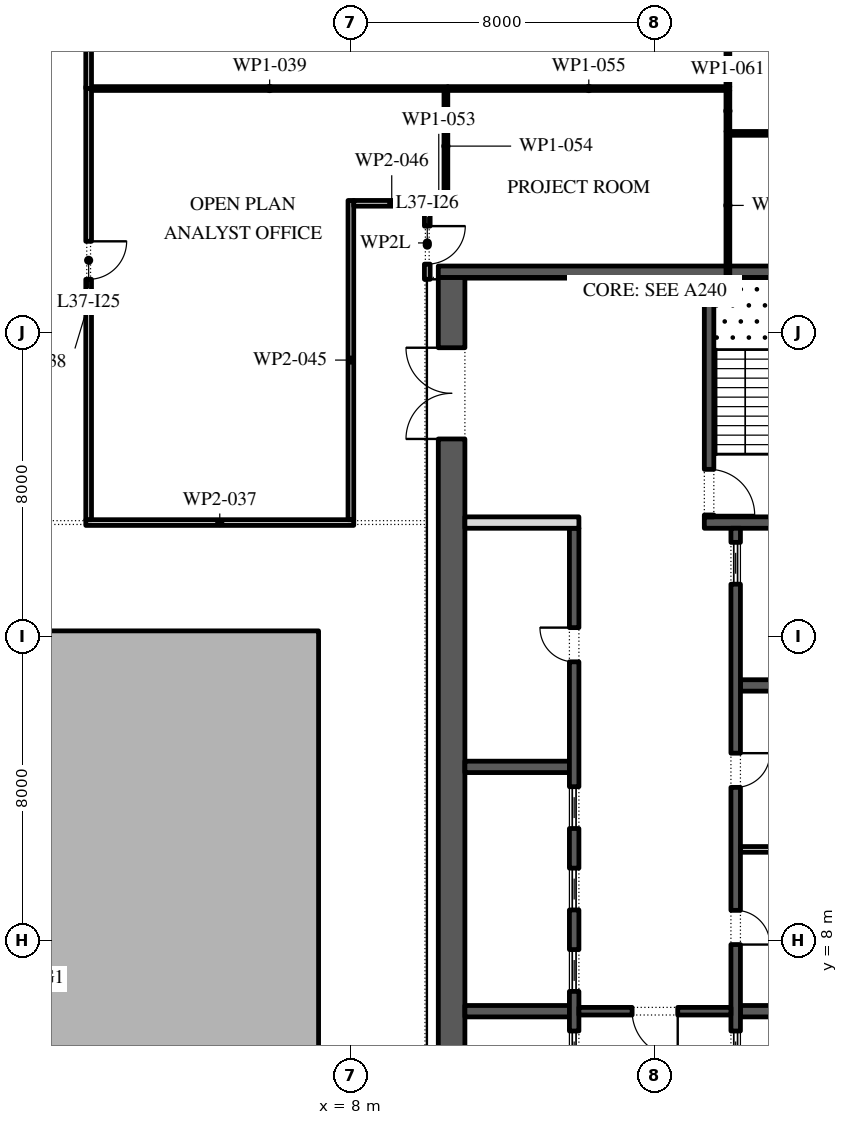
"""IFC4 building model, lengths in metres.
Left out: names, types, materials, properties, quantities, classifications, styles, units other than length and angle.
Written with IfcOpenShell. Run it as: python <this file> out.ifc"""

import sys

from ifc_helpers import new_model, si_unit, direction, frame, frame_2d, origin, place, context, subcontext, project, spatial, polyline, rectangle, outline, extrude, element, fill, save


model = new_model("IFC4")
c1 = context("Model", 3, precision=1e-05, world=origin(), true_north=direction((0.0, 1.0)))
c2 = subcontext(c1, "Body", "Model", "MODEL_VIEW")
j1 = project(units=[si_unit("LENGTHUNIT", "METRE"), si_unit("PLANEANGLEUNIT", "RADIAN")], contexts=[c1])
p1 = place(None, origin())
s1 = spatial("IfcSite", under=j1, at=p1, CompositionType="ELEMENT")
p2 = place(p1, origin())
s2 = spatial("IfcBuilding", under=s1, at=p2, CompositionType="ELEMENT")
p3 = place(p2, frame((0.0, 0.0, 171.6)))
s3 = spatial("IfcBuildingStorey", under=s2, at=p3, CompositionType="ELEMENT", Elevation=171.6)
p4 = place(p3, origin())
e1 = element("IfcWall", 1, at=p4, inside=s3, PredefinedType="STANDARD", context=c2, shape_type="SweptSolid", body=[
    extrude(outline(polyline([(-7.15, -2.15), (7.15, -2.15), (7.15, 16.15), (-7.15, 16.15), (-7.15, -2.15)]), holes=[polyline([(-7.0, -2.0), (-7.0, 16.0), (7.0, 16.0), (7.0, -2.0), (-7.0, -2.0)])]), origin(), (0.0, 0.0, 1.0), 4.0),
])
p5 = place(p3, frame((10.65, -2.45, 0.0), z_axis=(0.0, 0.0, 1.0), x_axis=(0.0, 1.0, 0.0)))
e2 = element("IfcWall", 2, at=p5, inside=s3, PredefinedType="SHEAR", context=c2, shape_type="SweptSolid", body=[
    extrude(rectangle(XDim=27.9, YDim=0.7, at=frame_2d((13.95, 0.0))), origin(), (0.0, 0.0, 1.0), 4.0),
])
p6 = place(p5, frame((23.65, 0.0, 0.0)))
e3 = element("IfcOpeningElement", 3, at=p6, cuts=e2, PredefinedType="OPENING", context=c2, shape_type="SweptSolid", body=[
    extrude(rectangle(XDim=2.4, YDim=2.1, at=frame_2d((1.2, 1.05))), frame((0.0, 0.36, 0.0), z_axis=(0.0, -1.0, 0.0), x_axis=(1.0, 0.0, 0.0)), (0.0, 0.0, 1.0), 0.72),
])
p7 = place(p5, frame((0.788, 0.0, 0.0)))
e4 = element("IfcOpeningElement", 4, at=p7, cuts=e2, PredefinedType="OPENING", context=c2, shape_type="SweptSolid", body=[
    extrude(rectangle(XDim=0.9, YDim=2.1, at=frame_2d((0.45, 1.05))), frame((0.0, 0.36, 0.0), z_axis=(0.0, -1.0, 0.0), x_axis=(1.0, 0.0, 0.0)), (0.0, 0.0, 1.0), 0.72),
])
p8 = place(p5, frame((3.962, 0.0, 0.0)))
e5 = element("IfcOpeningElement", 5, at=p8, cuts=e2, PredefinedType="OPENING", context=c2, shape_type="SweptSolid", body=[
    extrude(rectangle(XDim=1.0, YDim=2.1, at=frame_2d((0.5, 1.05))), frame((0.0, 0.36, 0.0), z_axis=(0.0, -1.0, 0.0), x_axis=(1.0, 0.0, 0.0)), (0.0, 0.0, 1.0), 0.72),
])
p9 = place(p3, frame((10.3, 25.6, 0.0), z_axis=(0.0, 0.0, 1.0), x_axis=(1.0, 0.0, 0.0)))
e6 = element("IfcWall", 6, at=p9, inside=s3, PredefinedType="SHEAR", context=c2, shape_type="SweptSolid", body=[
    extrude(rectangle(XDim=11.4, YDim=0.3, at=frame_2d((5.7, 0.0))), origin(), (0.0, 0.0, 1.0), 4.0),
])
p10 = place(p3, frame((17.3, 19.0, 0.0), z_axis=(0.0, 0.0, 1.0), x_axis=(1.0, 0.0, 0.0)))
e7 = element("IfcWall", 7, at=p10, inside=s3, PredefinedType="SHEAR", context=c2, shape_type="SweptSolid", body=[
    extrude(rectangle(XDim=3.7, YDim=0.3, at=frame_2d((1.85, 0.0))), origin(), (0.0, 0.0, 1.0), 4.0),
])
p11 = place(p3, frame((17.425, 19.15, 0.0), z_axis=(0.0, 0.0, 1.0), x_axis=(0.0, 1.0, 0.0)))
e8 = element("IfcWall", 8, at=p11, inside=s3, PredefinedType="SHEAR", context=c2, shape_type="SweptSolid", body=[
    extrude(rectangle(XDim=6.3, YDim=0.25, at=frame_2d((3.15, 0.0))), origin(), (0.0, 0.0, 1.0), 4.0),
])
p12 = place(p11, frame((0.05, 0.0, 0.0)))
e9 = element("IfcOpeningElement", 9, at=p12, cuts=e8, PredefinedType="OPENING", context=c2, shape_type="SweptSolid", body=[
    extrude(rectangle(XDim=1.2, YDim=2.1, at=frame_2d((0.6, 1.05))), frame((0.0, 0.135, 0.0), z_axis=(0.0, -1.0, 0.0), x_axis=(1.0, 0.0, 0.0)), (0.0, 0.0, 1.0), 0.27),
])
for number, where, z_axis, x_axis in (
    (10, (18.25, 6.143, 0.0), (0.0, 0.0, 1.0), (1.0, 0.0, 0.0)),
    (11, (18.25, 14.714, 0.0), (0.0, 0.0, 1.0), (1.0, 0.0, 0.0)),
):
    element("IfcWall", number, at=place(p3, frame(where, z_axis=z_axis, x_axis=x_axis)), inside=s3, PredefinedType="SHEAR", context=c2, shape_type="SweptSolid", body=[
        extrude(rectangle(XDim=2.75, YDim=0.3, at=frame_2d((1.375, 0.0))), origin(), (0.0, 0.0, 1.0), 4.0),
    ])
p13 = place(p3, frame((18.125, 4.15, 0.0), z_axis=(0.0, 0.0, 1.0), x_axis=(0.0, 1.0, 0.0)))
e12 = element("IfcWall", 12, at=p13, inside=s3, PredefinedType="SHEAR", context=c2, shape_type="SweptSolid", body=[
    extrude(rectangle(XDim=14.7, YDim=0.25, at=frame_2d((7.35, 0.0))), origin(), (0.0, 0.0, 1.0), 4.0),
])
p14 = place(p13, frame((3.746, 0.0, 0.0)))
e13 = element("IfcOpeningElement", 13, at=p14, cuts=e12, PredefinedType="OPENING", context=c2, shape_type="SweptSolid", body=[
    extrude(rectangle(XDim=0.9, YDim=2.1, at=frame_2d((0.45, 1.05))), frame((0.0, 0.135, 0.0), z_axis=(0.0, -1.0, 0.0), x_axis=(1.0, 0.0, 0.0)), (0.0, 0.0, 1.0), 0.27),
])
p15 = place(p13, frame((7.882, 0.0, 0.0)))
e14 = element("IfcOpeningElement", 14, at=p15, cuts=e12, PredefinedType="OPENING", context=c2, shape_type="SweptSolid", body=[
    extrude(rectangle(XDim=0.9, YDim=2.1, at=frame_2d((0.45, 1.05))), frame((0.0, 0.135, 0.0), z_axis=(0.0, -1.0, 0.0), x_axis=(1.0, 0.0, 0.0)), (0.0, 0.0, 1.0), 0.27),
])
p16 = place(p13, frame((0.371, 0.0, 0.0)))
e15 = element("IfcOpeningElement", 15, at=p16, cuts=e12, PredefinedType="OPENING", context=c2, shape_type="SweptSolid", body=[
    extrude(rectangle(XDim=1.1, YDim=2.1, at=frame_2d((0.55, 1.05))), frame((0.0, 0.135, 0.0), z_axis=(0.0, -1.0, 0.0), x_axis=(1.0, 0.0, 0.0)), (0.0, 0.0, 1.0), 0.27),
])
p17 = place(p13, frame((13.229, 0.0, 0.0)))
e16 = element("IfcOpeningElement", 16, at=p17, cuts=e12, PredefinedType="OPENING", context=c2, shape_type="SweptSolid", body=[
    extrude(rectangle(XDim=1.1, YDim=2.1, at=frame_2d((0.55, 1.05))), frame((0.0, 0.135, 0.0), z_axis=(0.0, -1.0, 0.0), x_axis=(1.0, 0.0, 0.0)), (0.0, 0.0, 1.0), 0.27),
])
p18 = place(p3, frame((18.25, 10.4, 0.0), z_axis=(0.0, 0.0, 1.0), x_axis=(1.0, 0.0, 0.0)))
e17 = element("IfcWall", 17, at=p18, inside=s3, PredefinedType="PARTITIONING", context=c2, shape_type="SweptSolid", body=[
    extrude(rectangle(XDim=2.75, YDim=0.15, at=frame_2d((1.375, 0.0))), origin(), (0.0, 0.0, 1.0), 4.0),
])
for number, where, z_axis, x_axis in (
    (18, (11.0, 6.143, 0.0), (0.0, 0.0, 1.0), (1.0, 0.0, 0.0)),
    (19, (11.0, 12.571, 0.0), (0.0, 0.0, 1.0), (1.0, 0.0, 0.0)),
):
    element("IfcWall", number, at=place(p3, frame(where, z_axis=z_axis, x_axis=x_axis)), inside=s3, PredefinedType="SHEAR", context=c2, shape_type="SweptSolid", body=[
        extrude(rectangle(XDim=2.75, YDim=0.3, at=frame_2d((1.375, 0.0))), origin(), (0.0, 0.0, 1.0), 4.0),
    ])
p19 = place(p3, frame((13.875, -2.45, 0.0), z_axis=(0.0, 0.0, 1.0), x_axis=(0.0, 1.0, 0.0)))
e20 = element("IfcWall", 20, at=p19, inside=s3, PredefinedType="SHEAR", context=c2, shape_type="SweptSolid", body=[
    extrude(rectangle(XDim=21.3, YDim=0.25, at=frame_2d((10.65, 0.0))), origin(), (0.0, 0.0, 1.0), 4.0),
])
p20 = place(p19, frame((17.786, 0.0, 0.0)))
e21 = element("IfcOpeningElement", 21, at=p20, cuts=e20, PredefinedType="OPENING", context=c2, shape_type="SweptSolid", body=[
    extrude(rectangle(XDim=0.9, YDim=2.1, at=frame_2d((0.45, 1.05))), frame((0.0, 0.135, 0.0), z_axis=(0.0, -1.0, 0.0), x_axis=(1.0, 0.0, 0.0)), (0.0, 0.0, 1.0), 0.27),
])
p21 = place(p19, frame((6.971, 0.0, 0.0)))
e22 = element("IfcOpeningElement", 22, at=p21, cuts=e20, PredefinedType="OPENING", context=c2, shape_type="SweptSolid", body=[
    extrude(rectangle(XDim=1.1, YDim=2.1, at=frame_2d((0.55, 1.05))), frame((0.0, 0.135, 0.0), z_axis=(0.0, -1.0, 0.0), x_axis=(1.0, 0.0, 0.0)), (0.0, 0.0, 1.0), 0.27),
])
p22 = place(p19, frame((9.114, 0.0, 0.0)))
e23 = element("IfcOpeningElement", 23, at=p22, cuts=e20, PredefinedType="OPENING", context=c2, shape_type="SweptSolid", body=[
    extrude(rectangle(XDim=1.1, YDim=2.1, at=frame_2d((0.55, 1.05))), frame((0.0, 0.135, 0.0), z_axis=(0.0, -1.0, 0.0), x_axis=(1.0, 0.0, 0.0)), (0.0, 0.0, 1.0), 0.27),
])
p23 = place(p19, frame((11.257, 0.0, 0.0)))
e24 = element("IfcOpeningElement", 24, at=p23, cuts=e20, PredefinedType="OPENING", context=c2, shape_type="SweptSolid", body=[
    extrude(rectangle(XDim=1.1, YDim=2.1, at=frame_2d((0.55, 1.05))), frame((0.0, 0.135, 0.0), z_axis=(0.0, -1.0, 0.0), x_axis=(1.0, 0.0, 0.0)), (0.0, 0.0, 1.0), 0.27),
])
p24 = place(p19, frame((13.4, 0.0, 0.0)))
e25 = element("IfcOpeningElement", 25, at=p24, cuts=e20, PredefinedType="OPENING", context=c2, shape_type="SweptSolid", body=[
    extrude(rectangle(XDim=1.1, YDim=2.1, at=frame_2d((0.55, 1.05))), frame((0.0, 0.135, 0.0), z_axis=(0.0, -1.0, 0.0), x_axis=(1.0, 0.0, 0.0)), (0.0, 0.0, 1.0), 0.27),
])
p25 = place(p3, frame((11.0, 19.0, 0.0), z_axis=(0.0, 0.0, 1.0), x_axis=(1.0, 0.0, 0.0)))
e26 = element("IfcWall", 26, at=p25, inside=s3, PredefinedType="PARTITIONING", context=c2, shape_type="SweptSolid", body=[
    extrude(rectangle(XDim=3.0, YDim=0.3, at=frame_2d((1.5, 0.0))), origin(), (0.0, 0.0, 1.0), 4.0),
])
p26 = place(p3, frame((14.0, 6.143, 0.0), z_axis=(0.0, 0.0, 1.0), x_axis=(1.0, 0.0, 0.0)))
e27 = element("IfcWall", 27, at=p26, inside=s3, PredefinedType="SHEAR", context=c2, shape_type="SweptSolid", body=[
    extrude(rectangle(XDim=4.0, YDim=0.2, at=frame_2d((2.0, 0.0))), origin(), (0.0, 0.0, 1.0), 4.0),
])
p27 = place(p26, frame((1.4, 0.0, 0.0)))
e28 = element("IfcOpeningElement", 28, at=p27, cuts=e27, PredefinedType="OPENING", context=c2, shape_type="SweptSolid", body=[
    extrude(rectangle(XDim=1.2, YDim=2.1, at=frame_2d((0.6, 1.05))), frame((0.0, 0.11, 0.0), z_axis=(0.0, -1.0, 0.0), x_axis=(1.0, 0.0, 0.0)), (0.0, 0.0, 1.0), 0.22),
])
p28 = place(p3, frame((1.025, 19.0, 0.0), z_axis=(0.0, 0.0, 1.0), x_axis=(1.0, 0.0, 0.0)))
e29 = element("IfcWall", 29, at=p28, inside=s3, PredefinedType="PARTITIONING", context=c2, shape_type="SweptSolid", body=[
    extrude(rectangle(XDim=7.05, YDim=0.15, at=frame_2d((3.525, 0.0))), origin(), (0.0, 0.0, 1.0), 4.0),
])
p29 = place(p3, frame((1.1, 30.47, 0.0), z_axis=(0.0, 0.0, 1.0), x_axis=(0.0, -1.0, 0.0)))
e30 = element("IfcWall", 30, at=p29, inside=s3, PredefinedType="PARTITIONING", context=c2, shape_type="SweptSolid", body=[
    extrude(rectangle(XDim=11.395, YDim=0.15, at=frame_2d((5.698, 0.0))), origin(), (0.0, 0.0, 1.0), 4.0),
])
p30 = place(p29, frame((4.07, 0.0, 0.0)))
e31 = element("IfcOpeningElement", 31, at=p30, cuts=e30, PredefinedType="OPENING", context=c2, shape_type="SweptSolid", body=[
    extrude(rectangle(XDim=1.0, YDim=2.1, at=frame_2d((0.5, 1.05))), frame((0.0, 0.085, 0.0), z_axis=(0.0, -1.0, 0.0), x_axis=(1.0, 0.0, 0.0)), (0.0, 0.0, 1.0), 0.17),
])
p31 = place(p3, frame((1.175, 30.42, 0.0), z_axis=(0.0, 0.0, 1.0), x_axis=(1.0, 0.0, 0.0)))
e32 = element("IfcWall", 32, at=p31, inside=s3, PredefinedType="PARTITIONING", context=c2, shape_type="SweptSolid", body=[
    extrude(rectangle(XDim=9.375, YDim=0.1, at=frame_2d((4.688, 0.0))), origin(), (0.0, 0.0, 1.0), 4.0),
])
p32 = place(p3, frame((1.1, 36.05, 0.0), z_axis=(0.0, 0.0, 1.0), x_axis=(0.0, -1.0, 0.0)))
e33 = element("IfcWall", 33, at=p32, inside=s3, PredefinedType="PARTITIONING", context=c2, shape_type="SweptSolid", body=[
    extrude(rectangle(XDim=5.63, YDim=0.15, at=frame_2d((2.815, 0.0))), origin(), (0.0, 0.0, 1.0), 4.0),
])
p33 = place(p32, frame((2.98, 0.0, 0.0)))
e34 = element("IfcOpeningElement", 34, at=p33, cuts=e33, PredefinedType="OPENING", context=c2, shape_type="SweptSolid", body=[
    extrude(rectangle(XDim=1.0, YDim=2.1, at=frame_2d((0.5, 1.05))), frame((0.0, 0.085, 0.0), z_axis=(0.0, -1.0, 0.0), x_axis=(1.0, 0.0, 0.0)), (0.0, 0.0, 1.0), 0.17),
])
p34 = place(p3, frame((8.0, 19.075, 0.0), z_axis=(0.0, 0.0, 1.0), x_axis=(0.0, 1.0, 0.0)))
e35 = element("IfcWall", 35, at=p34, inside=s3, PredefinedType="PARTITIONING", context=c2, shape_type="SweptSolid", body=[
    extrude(rectangle(XDim=8.4, YDim=0.15, at=frame_2d((4.2, 0.0))), origin(), (0.0, 0.0, 1.0), 4.0),
])
p35 = place(p3, frame((8.075, 27.4, 0.0), z_axis=(0.0, 0.0, 1.0), x_axis=(1.0, 0.0, 0.0)))
e36 = element("IfcWall", 36, at=p35, inside=s3, PredefinedType="PARTITIONING", context=c2, shape_type="SweptSolid", body=[
    extrude(rectangle(XDim=2.0, YDim=0.15, at=frame_2d((1.0, 0.0))), origin(), (0.0, 0.0, 1.0), 4.0),
])
p36 = place(p3, frame((10.01, 27.315, 0.0), z_axis=(0.0, 0.0, 1.0), x_axis=(0.0, -1.0, 0.0)))
e37 = element("IfcWall", 37, at=p36, inside=s3, PredefinedType="PARTITIONING", context=c2, shape_type="SweptSolid", body=[
    extrude(rectangle(XDim=1.915, YDim=0.15, at=frame_2d((0.958, 0.0))), origin(), (0.0, 0.0, 1.0), 3.02),
])
p37 = place(p36, frame((0.515, 0.0, 0.0)))
e38 = element("IfcOpeningElement", 38, at=p37, cuts=e37, PredefinedType="OPENING", context=c2, shape_type="SweptSolid", body=[
    extrude(rectangle(XDim=1.0, YDim=2.1, at=frame_2d((0.5, 1.05))), frame((0.0, 0.085, 0.0), z_axis=(0.0, -1.0, 0.0), x_axis=(1.0, 0.0, 0.0)), (0.0, 0.0, 1.0), 0.17),
])
p38 = place(p3, frame((10.55, 27.39, 0.0), z_axis=(0.0, 0.0, 1.0), x_axis=(-1.0, 0.0, 0.0)))
e39 = element("IfcWall", 39, at=p38, inside=s3, PredefinedType="PARTITIONING", context=c2, shape_type="SweptSolid", body=[
    extrude(rectangle(XDim=0.475, YDim=0.1, at=frame_2d((0.238, 0.0))), origin(), (0.0, 0.0, 1.0), 4.0),
])
p39 = place(p3, frame((10.5, 30.37, 0.0), z_axis=(0.0, 0.0, 1.0), x_axis=(0.0, -1.0, 0.0)))
e40 = element("IfcWall", 40, at=p39, inside=s3, PredefinedType="PARTITIONING", context=c2, shape_type="SweptSolid", body=[
    extrude(rectangle(XDim=2.93, YDim=0.1, at=frame_2d((1.465, 0.0))), origin(), (0.0, 0.0, 1.0), 4.0),
])
p40 = place(p3, frame((10.55, 30.42, 0.0), z_axis=(0.0, 0.0, 1.0), x_axis=(1.0, 0.0, 0.0)))
e41 = element("IfcWall", 41, at=p40, inside=s3, PredefinedType="PARTITIONING", context=c2, shape_type="SweptSolid", body=[
    extrude(rectangle(XDim=7.42, YDim=0.1, at=frame_2d((3.71, 0.0))), origin(), (0.0, 0.0, 1.0), 4.0),
])
p41 = place(p3, frame((17.92, 25.4, 0.0), z_axis=(0.0, 0.0, 1.0), x_axis=(0.0, 1.0, 0.0)))
e42 = element("IfcWall", 42, at=p41, inside=s3, PredefinedType="PARTITIONING", context=c2, shape_type="SweptSolid", body=[
    extrude(rectangle(XDim=3.89, YDim=0.1, at=frame_2d((1.945, 0.0))), origin(), (0.0, 0.0, 1.0), 4.0),
])
p42 = place(p3, frame((17.92, 29.29, 0.0), z_axis=(0.0, 0.0, 1.0), x_axis=(0.0, 1.0, 0.0)))
e43 = element("IfcWall", 43, at=p42, inside=s3, PredefinedType="PARTITIONING", context=c2, shape_type="SweptSolid", body=[
    extrude(rectangle(XDim=1.08, YDim=0.1, at=frame_2d((0.54, 0.0))), origin(), (0.0, 0.0, 1.0), 4.0),
])
p43 = place(p3, frame((17.97, 29.24, 0.0), z_axis=(0.0, 0.0, 1.0), x_axis=(1.0, 0.0, 0.0)))
e44 = element("IfcWall", 44, at=p43, inside=s3, PredefinedType="PARTITIONING", context=c2, shape_type="SweptSolid", body=[
    extrude(rectangle(XDim=4.04, YDim=0.1, at=frame_2d((2.02, 0.0))), origin(), (0.0, 0.0, 1.0), 4.0),
])
p44 = place(p3, frame((17.92, 30.47, 0.0), z_axis=(0.0, 0.0, 1.0), x_axis=(0.0, 1.0, 0.0)))
e45 = element("IfcWall", 45, at=p44, inside=s3, PredefinedType="PARTITIONING", context=c2, shape_type="SweptSolid", body=[
    extrude(rectangle(XDim=5.48, YDim=0.1, at=frame_2d((2.74, 0.0))), origin(), (0.0, 0.0, 1.0), 4.0),
])
p45 = place(p14, frame((0.9, -0.2, 0.0), z_axis=(0.0, 0.0, 1.0), x_axis=(-1.0, 0.0, 0.0)))
e46 = element("IfcDoor", 46, at=p45, inside=s3, OperationType="SINGLE_SWING_LEFT", PredefinedType="DOOR", context=c2, shape_type="SweptSolid", body=[
    extrude(rectangle(XDim=0.9, YDim=2.1, at=frame_2d((0.45, 1.05))), frame((0.0, -0.075, 0.0), z_axis=(0.0, -1.0, 0.0), x_axis=(1.0, 0.0, 0.0)), (0.0, 0.0, 1.0), 0.05),
])
fill(e13, e46)
p46 = place(p15, frame((0.9, -0.2, 0.0), z_axis=(0.0, 0.0, 1.0), x_axis=(-1.0, 0.0, 0.0)))
e47 = element("IfcDoor", 47, at=p46, inside=s3, OperationType="SINGLE_SWING_RIGHT", PredefinedType="DOOR", context=c2, shape_type="SweptSolid", body=[
    extrude(rectangle(XDim=0.9, YDim=2.1, at=frame_2d((0.45, 1.05))), frame((0.0, -0.075, 0.0), z_axis=(0.0, -1.0, 0.0), x_axis=(1.0, 0.0, 0.0)), (0.0, 0.0, 1.0), 0.05),
])
fill(e14, e47)
p47 = place(p16, origin())
e48 = element("IfcDoor", 48, at=p47, inside=s3, OperationType="SLIDING_TO_LEFT", PredefinedType="DOOR", context=c2, shape_type="SweptSolid", body=[
    extrude(rectangle(XDim=1.1, YDim=2.1, at=frame_2d((0.55, 1.05))), frame((0.0, 0.025, 0.0), z_axis=(0.0, -1.0, 0.0), x_axis=(1.0, 0.0, 0.0)), (0.0, 0.0, 1.0), 0.05),
])
fill(e15, e48)
p48 = place(p17, origin())
e49 = element("IfcDoor", 49, at=p48, inside=s3, OperationType="SLIDING_TO_LEFT", PredefinedType="DOOR", context=c2, shape_type="SweptSolid", body=[
    extrude(rectangle(XDim=1.1, YDim=2.1, at=frame_2d((0.55, 1.05))), frame((0.0, 0.025, 0.0), z_axis=(0.0, -1.0, 0.0), x_axis=(1.0, 0.0, 0.0)), (0.0, 0.0, 1.0), 0.05),
])
fill(e16, e49)
p49 = place(p20, origin())
e50 = element("IfcDoor", 50, at=p49, inside=s3, OperationType="SINGLE_SWING_LEFT", PredefinedType="DOOR", context=c2, shape_type="SweptSolid", body=[
    extrude(rectangle(XDim=0.9, YDim=2.1, at=frame_2d((0.45, 1.05))), frame((0.0, 0.125, 0.0), z_axis=(0.0, -1.0, 0.0), x_axis=(1.0, 0.0, 0.0)), (0.0, 0.0, 1.0), 0.05),
])
fill(e21, e50)
p50 = place(p21, origin())
e51 = element("IfcDoor", 51, at=p50, inside=s3, OperationType="SLIDING_TO_LEFT", PredefinedType="DOOR", context=c2, shape_type="SweptSolid", body=[
    extrude(rectangle(XDim=1.1, YDim=2.1, at=frame_2d((0.55, 1.05))), frame((0.0, 0.025, 0.0), z_axis=(0.0, -1.0, 0.0), x_axis=(1.0, 0.0, 0.0)), (0.0, 0.0, 1.0), 0.05),
])
fill(e22, e51)
p51 = place(p22, origin())
e52 = element("IfcDoor", 52, at=p51, inside=s3, OperationType="SLIDING_TO_LEFT", PredefinedType="DOOR", context=c2, shape_type="SweptSolid", body=[
    extrude(rectangle(XDim=1.1, YDim=2.1, at=frame_2d((0.55, 1.05))), frame((0.0, 0.025, 0.0), z_axis=(0.0, -1.0, 0.0), x_axis=(1.0, 0.0, 0.0)), (0.0, 0.0, 1.0), 0.05),
])
fill(e23, e52)
p52 = place(p23, origin())
e53 = element("IfcDoor", 53, at=p52, inside=s3, OperationType="SLIDING_TO_LEFT", PredefinedType="DOOR", context=c2, shape_type="SweptSolid", body=[
    extrude(rectangle(XDim=1.1, YDim=2.1, at=frame_2d((0.55, 1.05))), frame((0.0, 0.025, 0.0), z_axis=(0.0, -1.0, 0.0), x_axis=(1.0, 0.0, 0.0)), (0.0, 0.0, 1.0), 0.05),
])
fill(e24, e53)
p53 = place(p24, origin())
e54 = element("IfcDoor", 54, at=p53, inside=s3, OperationType="SLIDING_TO_LEFT", PredefinedType="DOOR", context=c2, shape_type="SweptSolid", body=[
    extrude(rectangle(XDim=1.1, YDim=2.1, at=frame_2d((0.55, 1.05))), frame((0.0, 0.025, 0.0), z_axis=(0.0, -1.0, 0.0), x_axis=(1.0, 0.0, 0.0)), (0.0, 0.0, 1.0), 0.05),
])
fill(e25, e54)
p54 = place(p27, frame((1.2, 0.0, 0.0), z_axis=(0.0, 0.0, 1.0), x_axis=(-1.0, 0.0, 0.0)))
e55 = element("IfcDoor", 55, at=p54, inside=s3, OperationType="SINGLE_SWING_RIGHT", PredefinedType="DOOR", context=c2, shape_type="SweptSolid", body=[
    extrude(rectangle(XDim=1.2, YDim=2.1, at=frame_2d((0.6, 1.05))), frame((0.0, 0.025, 0.0), z_axis=(0.0, -1.0, 0.0), x_axis=(1.0, 0.0, 0.0)), (0.0, 0.0, 1.0), 0.05),
])
fill(e28, e55)
p55 = place(p6, origin())
e56 = element("IfcDoor", 56, at=p55, inside=s3, OperationType="DOUBLE_DOOR_SINGLE_SWING", PredefinedType="DOOR", context=c2, shape_type="SweptSolid", body=[
    extrude(rectangle(XDim=2.4, YDim=2.1, at=frame_2d((1.2, 1.05))), frame((0.0, 0.025, 0.0), z_axis=(0.0, -1.0, 0.0), x_axis=(1.0, 0.0, 0.0)), (0.0, 0.0, 1.0), 0.05),
])
fill(e3, e56)
p56 = place(p12, frame((1.2, 0.0, 0.0), z_axis=(0.0, 0.0, 1.0), x_axis=(-1.0, 0.0, 0.0)))
e57 = element("IfcDoor", 57, at=p56, inside=s3, OperationType="SINGLE_SWING_LEFT", PredefinedType="DOOR", context=c2, shape_type="SweptSolid", body=[
    extrude(rectangle(XDim=1.2, YDim=2.1, at=frame_2d((0.6, 1.05))), frame((0.0, 0.025, 0.0), z_axis=(0.0, -1.0, 0.0), x_axis=(1.0, 0.0, 0.0)), (0.0, 0.0, 1.0), 0.05),
])
fill(e9, e57)
p57 = place(p30, origin())
e58 = element("IfcDoor", 58, at=p57, inside=s3, OperationType="SINGLE_SWING_RIGHT", PredefinedType="DOOR", context=c2, shape_type="SweptSolid", body=[
    extrude(rectangle(XDim=1.0, YDim=2.1, at=frame_2d((0.5, 1.05))), frame((0.0, 0.025, 0.0), z_axis=(0.0, -1.0, 0.0), x_axis=(1.0, 0.0, 0.0)), (0.0, 0.0, 1.0), 0.05),
])
fill(e31, e58)
p58 = place(p37, origin())
e59 = element("IfcDoor", 59, at=p58, inside=s3, OperationType="SINGLE_SWING_RIGHT", PredefinedType="DOOR", context=c2, shape_type="SweptSolid", body=[
    extrude(rectangle(XDim=1.0, YDim=2.1, at=frame_2d((0.5, 1.05))), frame((0.0, 0.025, 0.0), z_axis=(0.0, -1.0, 0.0), x_axis=(1.0, 0.0, 0.0)), (0.0, 0.0, 1.0), 0.05),
])
fill(e38, e59)
save(model, sys.argv[1])
